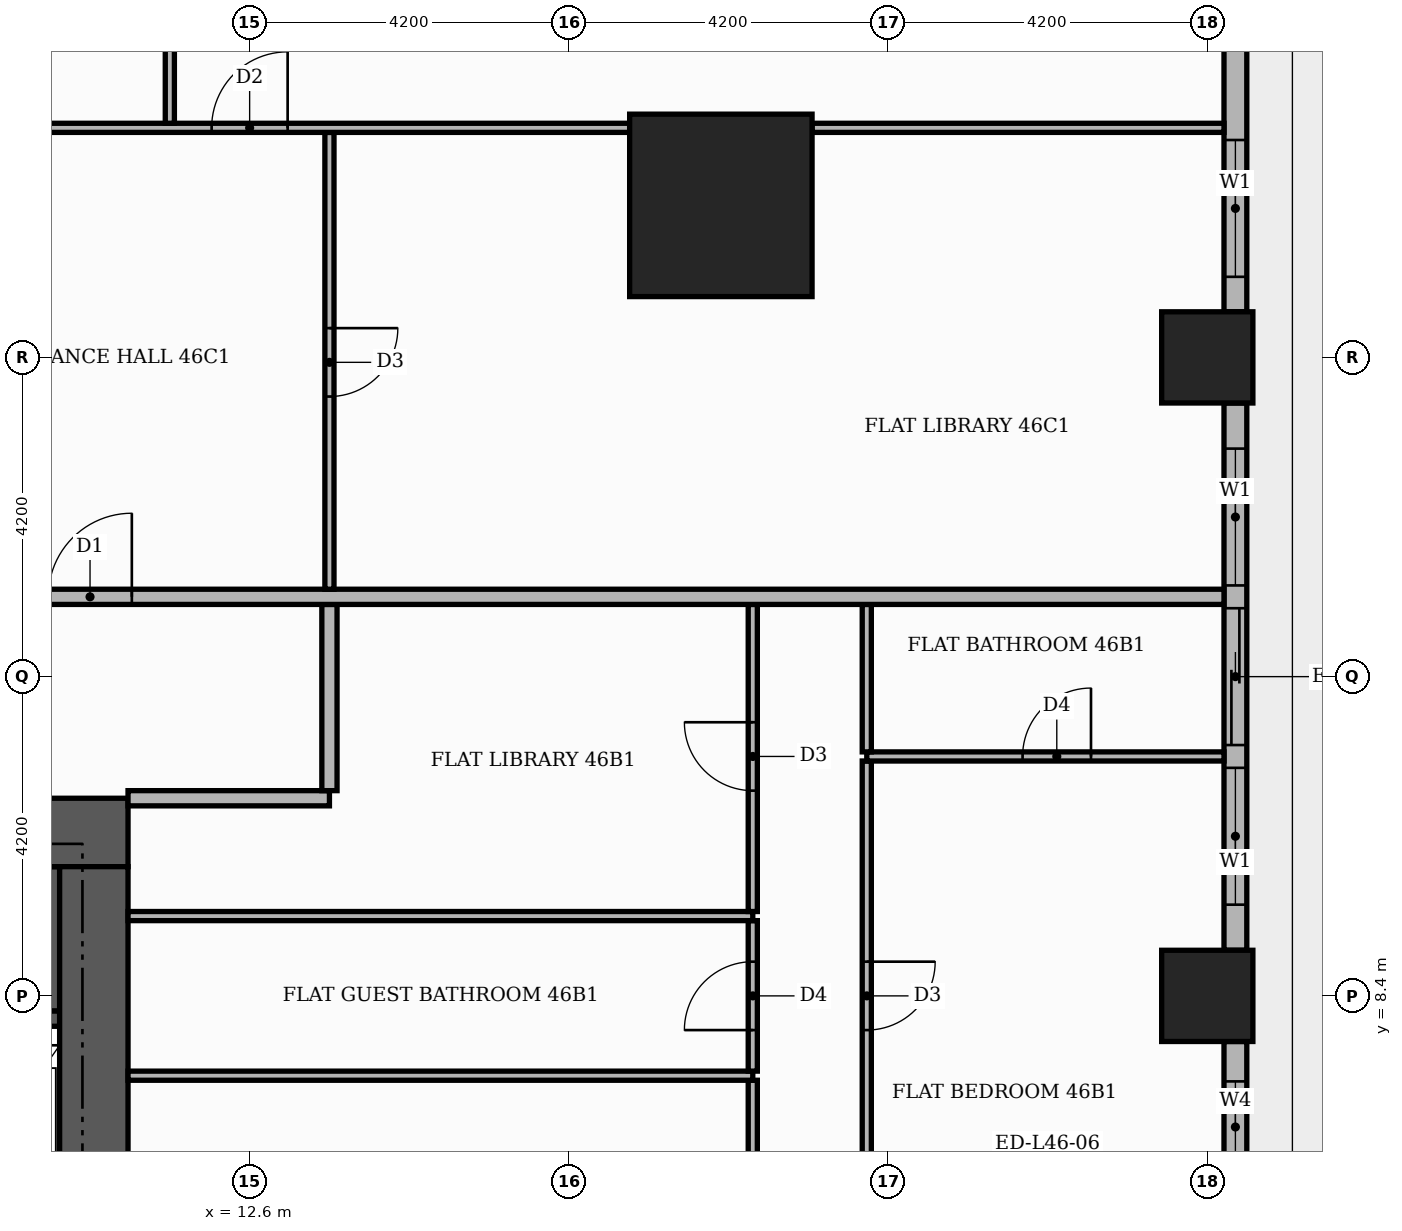
"""IFC4 building model, lengths in metres.
Left out: names, types, materials, properties, quantities, classifications, styles, units other than length and angle.
Written with IfcOpenShell. Run it as: python <this file> out.ifc"""

import sys

from ifc_helpers import new_model, si_unit, direction, frame, frame_2d, origin, origin_2d, place, context, subcontext, project, spatial, rectangle, extrude, element, fill, save


model = new_model("IFC4")
c1 = context("Model", 3, precision=1e-05, world=origin(), true_north=direction((0.0, 1.0)))
c2 = subcontext(c1, "Body", "Model", "MODEL_VIEW")
j1 = project(units=[si_unit("LENGTHUNIT", "METRE"), si_unit("PLANEANGLEUNIT", "RADIAN")], contexts=[c1])
p1 = place(None, origin())
s1 = spatial("IfcSite", under=j1, at=p1, CompositionType="ELEMENT")
p2 = place(p1, origin())
s2 = spatial("IfcBuilding", under=s1, at=p2, CompositionType="ELEMENT")
p3 = place(p2, frame((0.0, 0.0, 196.2)))
s3 = spatial("IfcBuildingStorey", under=s2, at=p3, CompositionType="ELEMENT", Elevation=196.2)
p4 = place(p3, frame((5.5, 9.15, 0.0), z_axis=(0.0, 0.0, 1.0), x_axis=(1.0, 0.0, 0.0)))
e1 = element("IfcWall", 1, at=p4, inside=s3, PredefinedType="SHEAR", context=c2, shape_type="SweptSolid", body=[
    extrude(rectangle(XDim=4.6, YDim=1.9, at=frame_2d((2.3, 0.0))), origin(), (0.0, 0.0, 1.0), 3.48),
])
p5 = place(p3, frame((8.1, 8.1, 0.0), z_axis=(0.0, 0.0, 1.0), x_axis=(1.0, 0.0, 0.0)))
e2 = element("IfcWall", 2, at=p5, inside=s3, PredefinedType="SHEAR", context=c2, shape_type="SweptSolid", body=[
    extrude(rectangle(XDim=2.0, YDim=0.2, at=frame_2d((1.0, 0.0))), origin(), (0.0, 0.0, 1.0), 3.48),
])
p6 = place(p3, frame((-11.0, 10.55, 0.0), z_axis=(0.0, 0.0, 1.0), x_axis=(1.0, 0.0, 0.0)))
e3 = element("IfcWall", 3, at=p6, inside=s3, PredefinedType="SHEAR", context=c2, shape_type="SweptSolid", body=[
    extrude(rectangle(XDim=22.0, YDim=0.9, at=frame_2d((11.0, 0.0))), origin(), (0.0, 0.0, 1.0), 3.48),
])
p7 = place(p6, frame((13.3, 0.0, 0.0)))
e4 = element("IfcOpeningElement", 4, at=p7, cuts=e3, PredefinedType="OPENING", context=c2, shape_type="SweptSolid", body=[
    extrude(rectangle(XDim=1.8, YDim=2.2, at=frame_2d((0.9, 1.1))), frame((0.0, 0.46, 0.0), z_axis=(0.0, -1.0, 0.0), x_axis=(1.0, 0.0, 0.0)), (0.0, 0.0, 1.0), 0.92),
])
p8 = place(p3, frame((10.55, -10.1, 0.0), z_axis=(0.0, 0.0, 1.0), x_axis=(0.0, 1.0, 0.0)))
e5 = element("IfcWall", 5, at=p8, inside=s3, PredefinedType="SHEAR", context=c2, shape_type="SweptSolid", body=[
    extrude(rectangle(XDim=20.2, YDim=0.9, at=frame_2d((10.1, 0.0))), origin(), (0.0, 0.0, 1.0), 3.48),
])
p9 = place(p3, frame((18.8, 18.8, 0.0), z_axis=(0.0, 0.0, 1.0), x_axis=(1.0, 0.0, 0.0)))
e6 = element("IfcColumn", 6, at=p9, inside=s3, PredefinedType="COLUMN", context=c2, shape_type="SweptSolid", body=[
    extrude(rectangle(XDim=2.4, YDim=2.4, at=origin_2d()), origin(), (0.0, 0.0, 1.0), 3.9),
])
for number, where, z_axis, x_axis in (
    (7, (25.2, 8.4, 0.0), (0.0, 0.0, 1.0), (1.0, 0.0, 0.0)),
    (8, (25.2, 16.8, 0.0), (0.0, 0.0, 1.0), (1.0, 0.0, 0.0)),
):
    element("IfcColumn", number, at=place(p3, frame(where, z_axis=z_axis, x_axis=x_axis)), inside=s3, PredefinedType="COLUMN", context=c2, shape_type="SweptSolid", body=[
        extrude(rectangle(XDim=1.2, YDim=1.2, at=origin_2d()), origin(), (0.0, 0.0, 1.0), 3.9),
    ])
p10 = place(p3, frame((25.57, 5.55, 0.0), z_axis=(0.0, 0.0, 1.0), x_axis=(0.0, 1.0, 0.0)))
e9 = element("IfcWall", 9, at=p10, inside=s3, PredefinedType="STANDARD", context=c2, shape_type="SweptSolid", body=[
    extrude(rectangle(XDim=2.25, YDim=0.3, at=frame_2d((1.125, 0.0))), origin(), (0.0, 0.0, 1.0), 3.48),
])
p11 = place(p10, frame((0.525, 0.0, 0.9)))
e10 = element("IfcOpeningElement", 10, at=p11, cuts=e9, PredefinedType="OPENING", context=c2, shape_type="SweptSolid", body=[
    extrude(rectangle(XDim=1.2, YDim=2.1, at=frame_2d((0.6, 1.05))), frame((0.0, 0.16, 0.0), z_axis=(0.0, -1.0, 0.0), x_axis=(1.0, 0.0, 0.0)), (0.0, 0.0, 1.0), 0.32),
])
p12 = place(p3, frame((25.57, 9.0, 0.0), z_axis=(0.0, 0.0, 1.0), x_axis=(0.0, 1.0, 0.0)))
e11 = element("IfcWall", 11, at=p12, inside=s3, PredefinedType="STANDARD", context=c2, shape_type="SweptSolid", body=[
    extrude(rectangle(XDim=7.2, YDim=0.3, at=frame_2d((3.6, 0.0))), origin(), (0.0, 0.0, 1.0), 3.48),
])
p13 = place(p12, frame((0.6, 0.0, 0.9)))
e12 = element("IfcOpeningElement", 12, at=p13, cuts=e11, PredefinedType="OPENING", context=c2, shape_type="SweptSolid", body=[
    extrude(rectangle(XDim=1.8, YDim=2.1, at=frame_2d((0.9, 1.05))), frame((0.0, 0.16, 0.0), z_axis=(0.0, -1.0, 0.0), x_axis=(1.0, 0.0, 0.0)), (0.0, 0.0, 1.0), 0.32),
])
p14 = place(p12, frame((2.7, 0.0, 0.0)))
e13 = element("IfcOpeningElement", 13, at=p14, cuts=e11, PredefinedType="OPENING", context=c2, shape_type="SweptSolid", body=[
    extrude(rectangle(XDim=1.8, YDim=2.4, at=frame_2d((0.9, 1.2))), frame((0.0, 0.16, 0.0), z_axis=(0.0, -1.0, 0.0), x_axis=(1.0, 0.0, 0.0)), (0.0, 0.0, 1.0), 0.32),
])
p15 = place(p12, frame((4.8, 0.0, 0.9)))
e14 = element("IfcOpeningElement", 14, at=p15, cuts=e11, PredefinedType="OPENING", context=c2, shape_type="SweptSolid", body=[
    extrude(rectangle(XDim=1.8, YDim=2.1, at=frame_2d((0.9, 1.05))), frame((0.0, 0.16, 0.0), z_axis=(0.0, -1.0, 0.0), x_axis=(1.0, 0.0, 0.0)), (0.0, 0.0, 1.0), 0.32),
])
p16 = place(p3, frame((25.57, 17.4, 0.0), z_axis=(0.0, 0.0, 1.0), x_axis=(0.0, 1.0, 0.0)))
e15 = element("IfcWall", 15, at=p16, inside=s3, PredefinedType="STANDARD", context=c2, shape_type="SweptSolid", body=[
    extrude(rectangle(XDim=3.82, YDim=0.3, at=frame_2d((1.91, 0.0))), origin(), (0.0, 0.0, 1.0), 3.48),
])
p17 = place(p16, frame((0.46, 0.0, 0.9)))
e16 = element("IfcOpeningElement", 16, at=p17, cuts=e15, PredefinedType="OPENING", context=c2, shape_type="SweptSolid", body=[
    extrude(rectangle(XDim=1.8, YDim=2.1, at=frame_2d((0.9, 1.05))), frame((0.0, 0.16, 0.0), z_axis=(0.0, -1.0, 0.0), x_axis=(1.0, 0.0, 0.0)), (0.0, 0.0, 1.0), 0.32),
])
p18 = place(p3, frame((19.22, 3.06, 0.0), z_axis=(0.0, 0.0, 1.0), x_axis=(0.0, 1.0, 0.0)))
e17 = element("IfcWall", 17, at=p18, inside=s3, PredefinedType="PARTITIONING", context=c2, shape_type="SweptSolid", body=[
    extrude(rectangle(XDim=4.23, YDim=0.12, at=frame_2d((2.115, 0.0))), origin(), (0.0, 0.0, 1.0), 3.48),
])
p19 = place(p18, frame((1.665, 0.0, 0.0)))
e18 = element("IfcOpeningElement", 18, at=p19, cuts=e17, PredefinedType="OPENING", context=c2, shape_type="SweptSolid", body=[
    extrude(rectangle(XDim=0.9, YDim=2.1, at=frame_2d((0.45, 1.05))), frame((0.0, 0.07, 0.0), z_axis=(0.0, -1.0, 0.0), x_axis=(1.0, 0.0, 0.0)), (0.0, 0.0, 1.0), 0.14),
])
p20 = place(p3, frame((20.72, 5.55, 0.0), z_axis=(0.0, 0.0, 1.0), x_axis=(0.0, 1.0, 0.0)))
e19 = element("IfcWall", 19, at=p20, inside=s3, PredefinedType="PARTITIONING", context=c2, shape_type="SweptSolid", body=[
    extrude(rectangle(XDim=5.94, YDim=0.12, at=frame_2d((2.97, 0.0))), origin(), (0.0, 0.0, 1.0), 3.48),
])
p21 = place(p20, frame((2.4, 0.0, 0.0)))
e20 = element("IfcOpeningElement", 20, at=p21, cuts=e19, PredefinedType="OPENING", context=c2, shape_type="SweptSolid", body=[
    extrude(rectangle(XDim=0.9, YDim=2.1, at=frame_2d((0.45, 1.05))), frame((0.0, 0.07, 0.0), z_axis=(0.0, -1.0, 0.0), x_axis=(1.0, 0.0, 0.0)), (0.0, 0.0, 1.0), 0.14),
])
p22 = place(p3, frame((11.0, 7.35, 0.0), z_axis=(0.0, 0.0, 1.0), x_axis=(1.0, 0.0, 0.0)))
e21 = element("IfcWall", 21, at=p22, inside=s3, PredefinedType="PARTITIONING", context=c2, shape_type="SweptSolid", body=[
    extrude(rectangle(XDim=8.22, YDim=0.12, at=frame_2d((4.11, 0.0))), origin(), (0.0, 0.0, 1.0), 3.48),
])
p23 = place(p3, frame((19.22, 7.41, 0.0), z_axis=(0.0, 0.0, 1.0), x_axis=(0.0, 1.0, 0.0)))
e22 = element("IfcWall", 22, at=p23, inside=s3, PredefinedType="PARTITIONING", context=c2, shape_type="SweptSolid", body=[
    extrude(rectangle(XDim=1.98, YDim=0.12, at=frame_2d((0.99, 0.0))), origin(), (0.0, 0.0, 1.0), 3.48),
])
p24 = place(p23, frame((0.54, 0.0, 0.0)))
e23 = element("IfcOpeningElement", 23, at=p24, cuts=e22, PredefinedType="OPENING", context=c2, shape_type="SweptSolid", body=[
    extrude(rectangle(XDim=0.9, YDim=2.1, at=frame_2d((0.45, 1.05))), frame((0.0, 0.07, 0.0), z_axis=(0.0, -1.0, 0.0), x_axis=(1.0, 0.0, 0.0)), (0.0, 0.0, 1.0), 0.14),
])
p25 = place(p3, frame((11.0, 9.45, 0.0), z_axis=(0.0, 0.0, 1.0), x_axis=(1.0, 0.0, 0.0)))
e24 = element("IfcWall", 24, at=p25, inside=s3, PredefinedType="PARTITIONING", context=c2, shape_type="SweptSolid", body=[
    extrude(rectangle(XDim=8.22, YDim=0.12, at=frame_2d((4.11, 0.0))), origin(), (0.0, 0.0, 1.0), 3.48),
])
p26 = place(p3, frame((19.22, 9.51, 0.0), z_axis=(0.0, 0.0, 1.0), x_axis=(0.0, 1.0, 0.0)))
e25 = element("IfcWall", 25, at=p26, inside=s3, PredefinedType="PARTITIONING", context=c2, shape_type="SweptSolid", body=[
    extrude(rectangle(XDim=4.04, YDim=0.12, at=frame_2d((2.02, 0.0))), origin(), (0.0, 0.0, 1.0), 3.48),
])
p27 = place(p26, frame((1.59, 0.0, 0.0)))
e26 = element("IfcOpeningElement", 26, at=p27, cuts=e25, PredefinedType="OPENING", context=c2, shape_type="SweptSolid", body=[
    extrude(rectangle(XDim=0.9, YDim=2.1, at=frame_2d((0.45, 1.05))), frame((0.0, 0.07, 0.0), z_axis=(0.0, -1.0, 0.0), x_axis=(1.0, 0.0, 0.0)), (0.0, 0.0, 1.0), 0.14),
])
p28 = place(p3, frame((11.0, 11.0, 0.0), z_axis=(0.0, 0.0, 1.0), x_axis=(1.0, 0.0, 0.0)))
e27 = element("IfcWall", 27, at=p28, inside=s3, PredefinedType="PARTITIONING", context=c2, shape_type="SweptSolid", body=[
    extrude(rectangle(XDim=2.65, YDim=0.2, at=frame_2d((1.325, 0.0))), origin(), (0.0, 0.0, 1.0), 3.48),
])
p29 = place(p3, frame((13.65, 11.1, 0.0), z_axis=(0.0, 0.0, 1.0), x_axis=(0.0, 1.0, 0.0)))
e28 = element("IfcWall", 28, at=p29, inside=s3, PredefinedType="PARTITIONING", context=c2, shape_type="SweptSolid", body=[
    extrude(rectangle(XDim=2.45, YDim=0.2, at=frame_2d((1.225, 0.0))), origin(), (0.0, 0.0, 1.0), 3.48),
])
p30 = place(p3, frame((20.72, 11.55, 0.0), z_axis=(0.0, 0.0, 1.0), x_axis=(1.0, 0.0, 0.0)))
e29 = element("IfcWall", 29, at=p30, inside=s3, PredefinedType="PARTITIONING", context=c2, shape_type="SweptSolid", body=[
    extrude(rectangle(XDim=4.7, YDim=0.12, at=frame_2d((2.35, 0.0))), origin(), (0.0, 0.0, 1.0), 3.48),
])
p31 = place(p30, frame((2.05, 0.0, 0.0)))
e30 = element("IfcOpeningElement", 30, at=p31, cuts=e29, PredefinedType="OPENING", context=c2, shape_type="SweptSolid", body=[
    extrude(rectangle(XDim=0.9, YDim=2.1, at=frame_2d((0.45, 1.05))), frame((0.0, 0.07, 0.0), z_axis=(0.0, -1.0, 0.0), x_axis=(1.0, 0.0, 0.0)), (0.0, 0.0, 1.0), 0.14),
])
p32 = place(p3, frame((20.72, 11.61, 0.0), z_axis=(0.0, 0.0, 1.0), x_axis=(0.0, 1.0, 0.0)))
e31 = element("IfcWall", 31, at=p32, inside=s3, PredefinedType="PARTITIONING", context=c2, shape_type="SweptSolid", body=[
    extrude(rectangle(XDim=1.94, YDim=0.12, at=frame_2d((0.97, 0.0))), origin(), (0.0, 0.0, 1.0), 3.48),
])
p33 = place(p3, frame((-13.65, 13.65, 0.0), z_axis=(0.0, 0.0, 1.0), x_axis=(1.0, 0.0, 0.0)))
e32 = element("IfcWall", 32, at=p33, inside=s3, PredefinedType="PARTITIONING", context=c2, shape_type="SweptSolid", body=[
    extrude(rectangle(XDim=39.07, YDim=0.2, at=frame_2d((19.535, 0.0))), origin(), (0.0, 0.0, 1.0), 3.48),
])
p34 = place(p33, frame((23.6, 0.0, 0.0)))
e33 = element("IfcOpeningElement", 33, at=p34, cuts=e32, PredefinedType="OPENING", context=c2, shape_type="SweptSolid", body=[
    extrude(rectangle(XDim=1.1, YDim=2.4, at=frame_2d((0.55, 1.2))), frame((0.0, 0.11, 0.0), z_axis=(0.0, -1.0, 0.0), x_axis=(1.0, 0.0, 0.0)), (0.0, 0.0, 1.0), 0.22),
])
p35 = place(p3, frame((13.65, 13.75, 0.0), z_axis=(0.0, 0.0, 1.0), x_axis=(0.0, 1.0, 0.0)))
e34 = element("IfcWall", 34, at=p35, inside=s3, PredefinedType="PARTITIONING", context=c2, shape_type="SweptSolid", body=[
    extrude(rectangle(XDim=6.01, YDim=0.12, at=frame_2d((3.005, 0.0))), origin(), (0.0, 0.0, 1.0), 3.48),
])
p36 = place(p35, frame((2.535, 0.0, 0.0)))
e35 = element("IfcOpeningElement", 35, at=p36, cuts=e34, PredefinedType="OPENING", context=c2, shape_type="SweptSolid", body=[
    extrude(rectangle(XDim=0.9, YDim=2.1, at=frame_2d((0.45, 1.05))), frame((0.0, 0.07, 0.0), z_axis=(0.0, -1.0, 0.0), x_axis=(1.0, 0.0, 0.0)), (0.0, 0.0, 1.0), 0.14),
])
p37 = place(p3, frame((-13.55, 19.82, 0.0), z_axis=(0.0, 0.0, 1.0), x_axis=(1.0, 0.0, 0.0)))
e36 = element("IfcWall", 36, at=p37, inside=s3, PredefinedType="PARTITIONING", context=c2, shape_type="SweptSolid", body=[
    extrude(rectangle(XDim=31.15, YDim=0.12, at=frame_2d((15.575, 0.0))), origin(), (0.0, 0.0, 1.0), 3.48),
])
p38 = place(p37, frame((25.65, 0.0, 0.0)))
e37 = element("IfcOpeningElement", 37, at=p38, cuts=e36, PredefinedType="OPENING", context=c2, shape_type="SweptSolid", body=[
    extrude(rectangle(XDim=1.0, YDim=2.1, at=frame_2d((0.5, 1.05))), frame((0.0, 0.07, 0.0), z_axis=(0.0, -1.0, 0.0), x_axis=(1.0, 0.0, 0.0)), (0.0, 0.0, 1.0), 0.14),
])
p39 = place(p37, frame((22.55, 0.0, 0.0)))
e38 = element("IfcOpeningElement", 38, at=p39, cuts=e36, PredefinedType="OPENING", context=c2, shape_type="SweptSolid", body=[
    extrude(rectangle(XDim=0.9, YDim=2.1, at=frame_2d((0.45, 1.05))), frame((0.0, 0.07, 0.0), z_axis=(0.0, -1.0, 0.0), x_axis=(1.0, 0.0, 0.0)), (0.0, 0.0, 1.0), 0.14),
])
p40 = place(p37, frame((18.35, 0.0, 0.0)))
e39 = element("IfcOpeningElement", 39, at=p40, cuts=e36, PredefinedType="OPENING", context=c2, shape_type="SweptSolid", body=[
    extrude(rectangle(XDim=0.9, YDim=2.1, at=frame_2d((0.45, 1.05))), frame((0.0, 0.07, 0.0), z_axis=(0.0, -1.0, 0.0), x_axis=(1.0, 0.0, 0.0)), (0.0, 0.0, 1.0), 0.14),
])
p41 = place(p37, frame((9.95, 0.0, 0.0)))
e40 = element("IfcOpeningElement", 40, at=p41, cuts=e36, PredefinedType="OPENING", context=c2, shape_type="SweptSolid", body=[
    extrude(rectangle(XDim=0.9, YDim=2.1, at=frame_2d((0.45, 1.05))), frame((0.0, 0.07, 0.0), z_axis=(0.0, -1.0, 0.0), x_axis=(1.0, 0.0, 0.0)), (0.0, 0.0, 1.0), 0.14),
])
p42 = place(p37, frame((3.65, 0.0, 0.0)))
e41 = element("IfcOpeningElement", 41, at=p42, cuts=e36, PredefinedType="OPENING", context=c2, shape_type="SweptSolid", body=[
    extrude(rectangle(XDim=0.9, YDim=2.1, at=frame_2d((0.45, 1.05))), frame((0.0, 0.07, 0.0), z_axis=(0.0, -1.0, 0.0), x_axis=(1.0, 0.0, 0.0)), (0.0, 0.0, 1.0), 0.14),
])
p43 = place(p3, frame((20.0, 19.82, 0.0), z_axis=(0.0, 0.0, 1.0), x_axis=(1.0, 0.0, 0.0)))
e42 = element("IfcWall", 42, at=p43, inside=s3, PredefinedType="PARTITIONING", context=c2, shape_type="SweptSolid", body=[
    extrude(rectangle(XDim=5.42, YDim=0.12, at=frame_2d((2.71, 0.0))), origin(), (0.0, 0.0, 1.0), 3.48),
])
p44 = place(p3, frame((11.55, 19.88, 0.0), z_axis=(0.0, 0.0, 1.0), x_axis=(0.0, 1.0, 0.0)))
e43 = element("IfcWall", 43, at=p44, inside=s3, PredefinedType="PARTITIONING", context=c2, shape_type="SweptSolid", body=[
    extrude(rectangle(XDim=5.54, YDim=0.12, at=frame_2d((2.77, 0.0))), origin(), (0.0, 0.0, 1.0), 3.48),
])
p45 = place(p11, origin())
e44 = element("IfcWindow", 44, at=p45, inside=s3, PartitioningType="SINGLE_PANEL", PredefinedType="WINDOW", context=c2, shape_type="SweptSolid", body=[
    extrude(rectangle(XDim=1.2, YDim=2.1, at=frame_2d((0.6, 1.05))), frame((0.0, 0.03, 0.0), z_axis=(0.0, -1.0, 0.0), x_axis=(1.0, 0.0, 0.0)), (0.0, 0.0, 1.0), 0.06),
])
fill(e10, e44)
p46 = place(p13, origin())
e45 = element("IfcWindow", 45, at=p46, inside=s3, PartitioningType="SINGLE_PANEL", PredefinedType="WINDOW", context=c2, shape_type="SweptSolid", body=[
    extrude(rectangle(XDim=1.8, YDim=2.1, at=frame_2d((0.9, 1.05))), frame((0.0, 0.03, 0.0), z_axis=(0.0, -1.0, 0.0), x_axis=(1.0, 0.0, 0.0)), (0.0, 0.0, 1.0), 0.06),
])
fill(e12, e45)
p47 = place(p14, origin())
e46 = element("IfcDoor", 46, at=p47, inside=s3, OperationType="SLIDING_TO_RIGHT", PredefinedType="DOOR", context=c2, shape_type="SweptSolid", body=[
    extrude(rectangle(XDim=1.8, YDim=2.4, at=frame_2d((0.9, 1.2))), frame((0.0, 0.025, 0.0), z_axis=(0.0, -1.0, 0.0), x_axis=(1.0, 0.0, 0.0)), (0.0, 0.0, 1.0), 0.05),
])
fill(e13, e46)
p48 = place(p15, origin())
e47 = element("IfcWindow", 47, at=p48, inside=s3, PartitioningType="SINGLE_PANEL", PredefinedType="WINDOW", context=c2, shape_type="SweptSolid", body=[
    extrude(rectangle(XDim=1.8, YDim=2.1, at=frame_2d((0.9, 1.05))), frame((0.0, 0.03, 0.0), z_axis=(0.0, -1.0, 0.0), x_axis=(1.0, 0.0, 0.0)), (0.0, 0.0, 1.0), 0.06),
])
fill(e14, e47)
p49 = place(p17, origin())
e48 = element("IfcWindow", 48, at=p49, inside=s3, PartitioningType="SINGLE_PANEL", PredefinedType="WINDOW", context=c2, shape_type="SweptSolid", body=[
    extrude(rectangle(XDim=1.8, YDim=2.1, at=frame_2d((0.9, 1.05))), frame((0.0, 0.03, 0.0), z_axis=(0.0, -1.0, 0.0), x_axis=(1.0, 0.0, 0.0)), (0.0, 0.0, 1.0), 0.06),
])
fill(e16, e48)
p50 = place(p24, origin())
e49 = element("IfcDoor", 49, at=p50, inside=s3, OperationType="SINGLE_SWING_LEFT", PredefinedType="DOOR", context=c2, shape_type="SweptSolid", body=[
    extrude(rectangle(XDim=0.9, YDim=2.1, at=frame_2d((0.45, 1.05))), frame((0.0, 0.025, 0.0), z_axis=(0.0, -1.0, 0.0), x_axis=(1.0, 0.0, 0.0)), (0.0, 0.0, 1.0), 0.05),
])
fill(e23, e49)
p51 = place(p27, origin())
e50 = element("IfcDoor", 50, at=p51, inside=s3, OperationType="SINGLE_SWING_RIGHT", PredefinedType="DOOR", context=c2, shape_type="SweptSolid", body=[
    extrude(rectangle(XDim=0.9, YDim=2.1, at=frame_2d((0.45, 1.05))), frame((0.0, 0.025, 0.0), z_axis=(0.0, -1.0, 0.0), x_axis=(1.0, 0.0, 0.0)), (0.0, 0.0, 1.0), 0.05),
])
fill(e26, e50)
p52 = place(p21, frame((0.9, 0.0, 0.0), z_axis=(0.0, 0.0, 1.0), x_axis=(-1.0, 0.0, 0.0)))
e51 = element("IfcDoor", 51, at=p52, inside=s3, OperationType="SINGLE_SWING_RIGHT", PredefinedType="DOOR", context=c2, shape_type="SweptSolid", body=[
    extrude(rectangle(XDim=0.9, YDim=2.1, at=frame_2d((0.45, 1.05))), frame((0.0, 0.025, 0.0), z_axis=(0.0, -1.0, 0.0), x_axis=(1.0, 0.0, 0.0)), (0.0, 0.0, 1.0), 0.05),
])
fill(e20, e51)
p53 = place(p31, origin())
e52 = element("IfcDoor", 52, at=p53, inside=s3, OperationType="SINGLE_SWING_RIGHT", PredefinedType="DOOR", context=c2, shape_type="SweptSolid", body=[
    extrude(rectangle(XDim=0.9, YDim=2.1, at=frame_2d((0.45, 1.05))), frame((0.0, 0.025, 0.0), z_axis=(0.0, -1.0, 0.0), x_axis=(1.0, 0.0, 0.0)), (0.0, 0.0, 1.0), 0.05),
])
fill(e30, e52)
p54 = place(p34, origin())
e53 = element("IfcDoor", 53, at=p54, inside=s3, OperationType="SINGLE_SWING_RIGHT", PredefinedType="DOOR", context=c2, shape_type="SweptSolid", body=[
    extrude(rectangle(XDim=1.1, YDim=2.4, at=frame_2d((0.55, 1.2))), frame((0.0, 0.025, 0.0), z_axis=(0.0, -1.0, 0.0), x_axis=(1.0, 0.0, 0.0)), (0.0, 0.0, 1.0), 0.05),
])
fill(e33, e53)
p55 = place(p36, frame((0.9, 0.0, 0.0), z_axis=(0.0, 0.0, 1.0), x_axis=(-1.0, 0.0, 0.0)))
e54 = element("IfcDoor", 54, at=p55, inside=s3, OperationType="SINGLE_SWING_RIGHT", PredefinedType="DOOR", context=c2, shape_type="SweptSolid", body=[
    extrude(rectangle(XDim=0.9, YDim=2.1, at=frame_2d((0.45, 1.05))), frame((0.0, 0.025, 0.0), z_axis=(0.0, -1.0, 0.0), x_axis=(1.0, 0.0, 0.0)), (0.0, 0.0, 1.0), 0.05),
])
fill(e35, e54)
p56 = place(p38, origin())
e55 = element("IfcDoor", 55, at=p56, inside=s3, OperationType="SINGLE_SWING_RIGHT", PredefinedType="DOOR", context=c2, shape_type="SweptSolid", body=[
    extrude(rectangle(XDim=1.0, YDim=2.1, at=frame_2d((0.5, 1.05))), frame((0.0, 0.025, 0.0), z_axis=(0.0, -1.0, 0.0), x_axis=(1.0, 0.0, 0.0)), (0.0, 0.0, 1.0), 0.05),
])
fill(e37, e55)
save(model, sys.argv[1])
